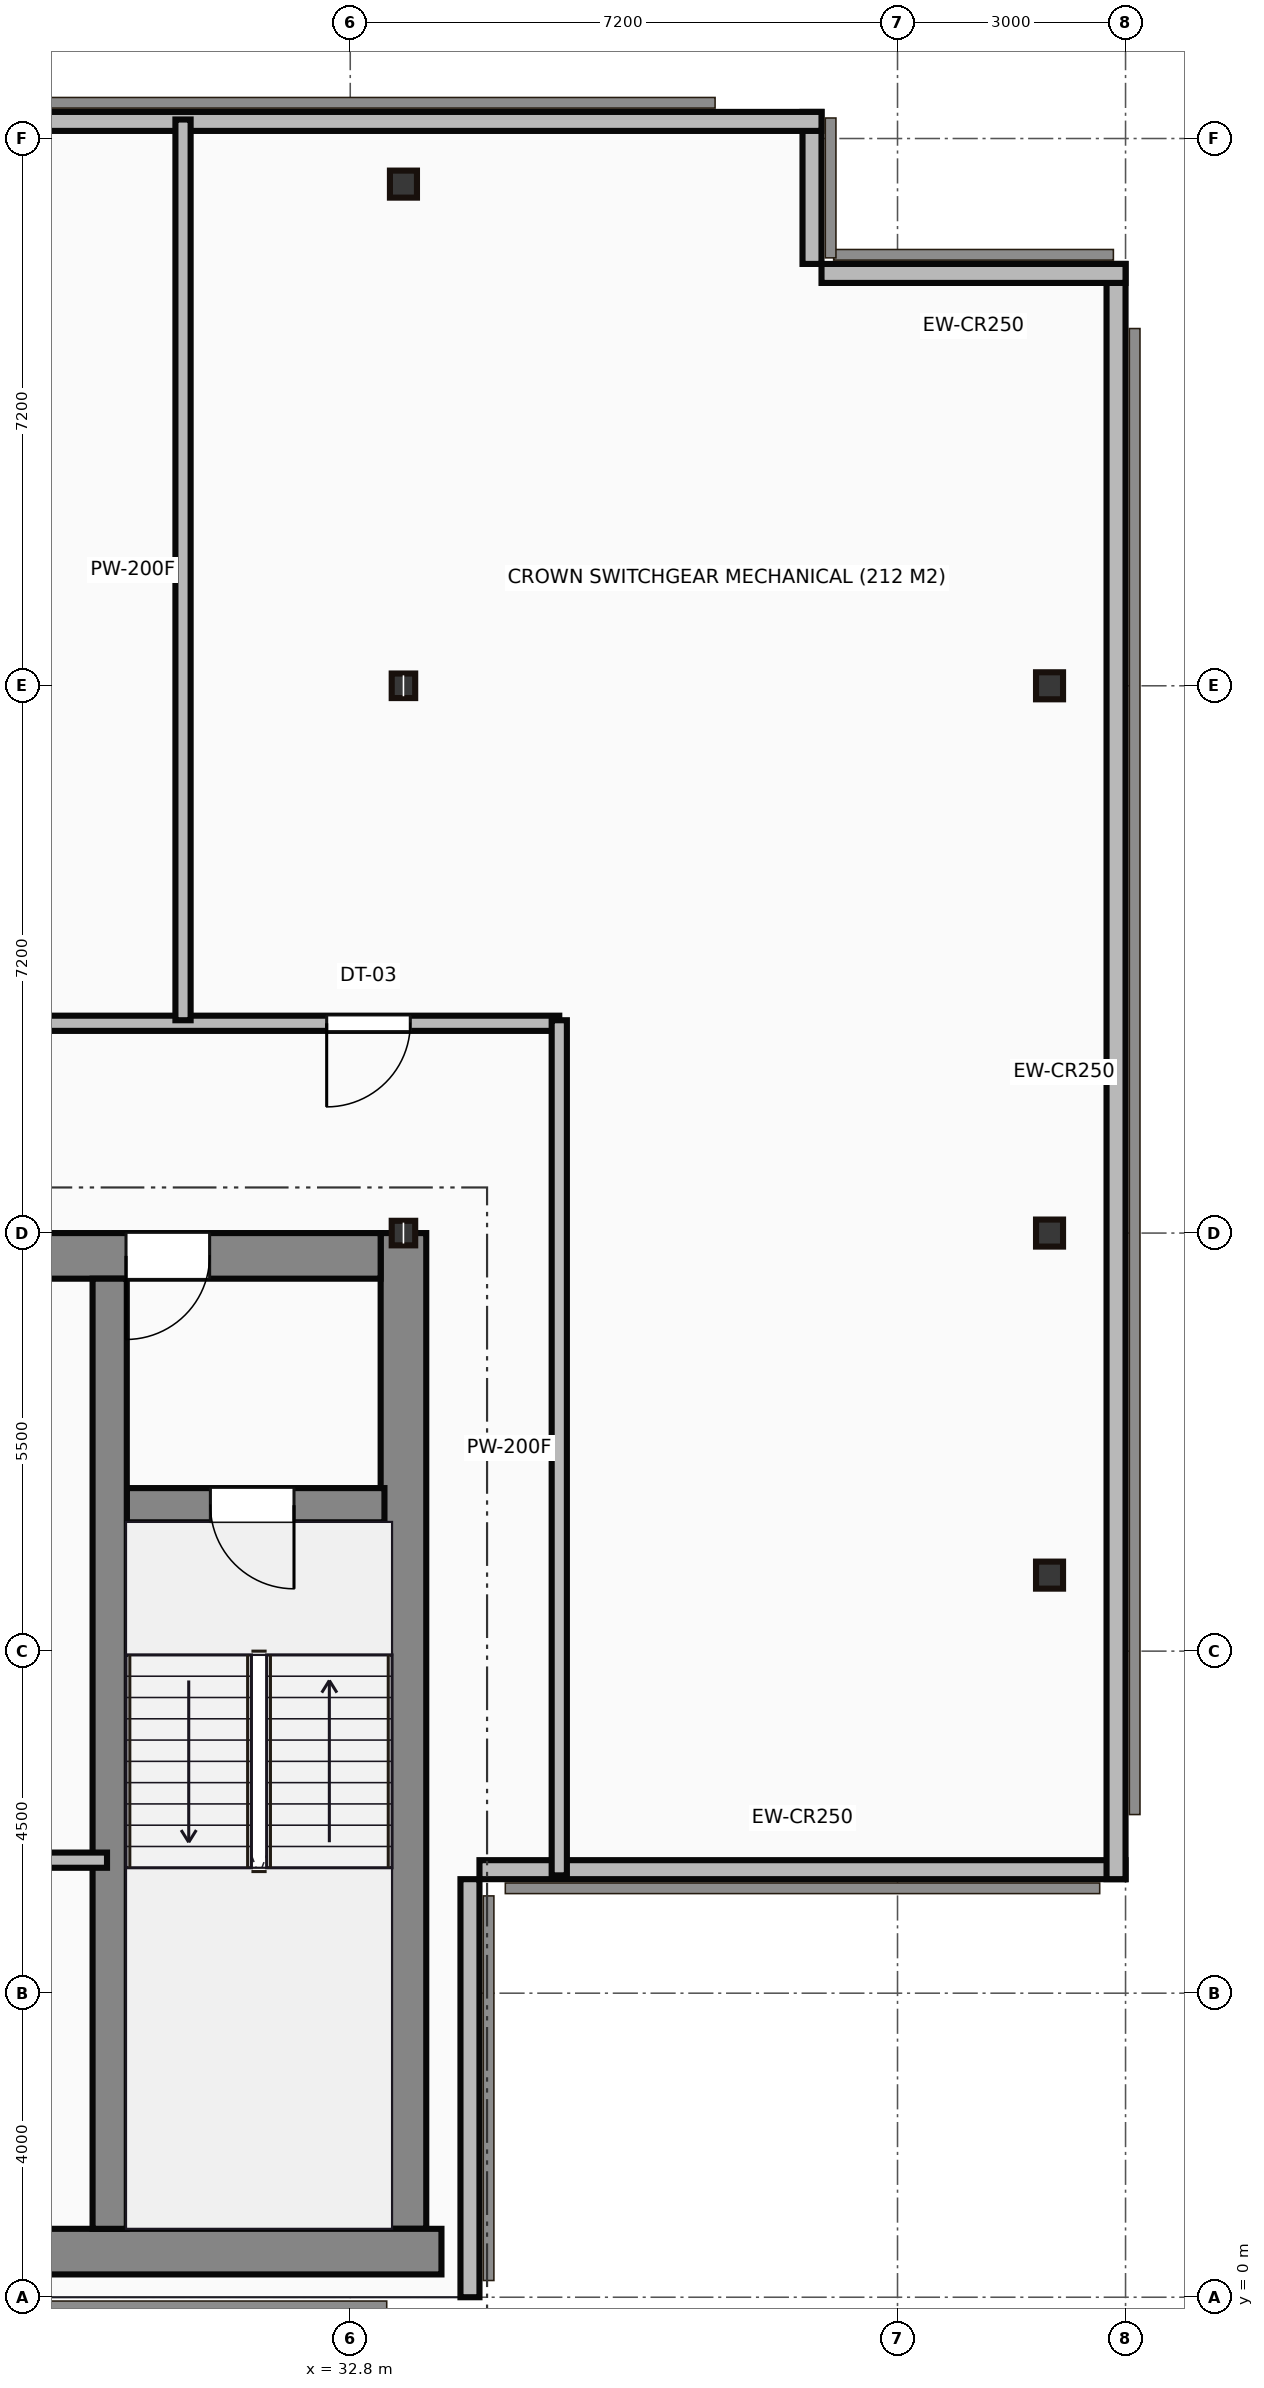
"""IFC4 building model, lengths in metres.
Left out: names, types, materials, properties, quantities, classifications, styles, units other than length and angle.
Written with IfcOpenShell. Run it as: python <this file> out.ifc"""

import sys

from ifc_helpers import new_model, si_unit, direction, frame, frame_2d, origin, origin_2d, place, context, subcontext, project, spatial, rectangle, hollow_rectangle, i_section, extrude, source, transform, mapped, element, fill, save


model = new_model("IFC4")
c1 = context("Model", 3, precision=1e-05, world=origin(), true_north=direction((0.0, 1.0)))
c2 = subcontext(c1, "Body", "Model", "MODEL_VIEW")
j1 = project(units=[si_unit("LENGTHUNIT", "METRE"), si_unit("PLANEANGLEUNIT", "RADIAN")], contexts=[c1])
p1 = place(None, origin())
s1 = spatial("IfcSite", under=j1, at=p1, CompositionType="ELEMENT")
p2 = place(p1, origin())
s2 = spatial("IfcBuilding", under=s1, at=p2, CompositionType="ELEMENT")
p3 = place(p2, frame((0.0, 0.0, 303.65)))
s3 = spatial("IfcBuildingStorey", under=s2, at=p3, CompositionType="ELEMENT", Elevation=303.65)
m1 = source(origin(), c2, "Body", "SweptSolid", [
    extrude(rectangle(XDim=29.5, YDim=0.6, at=frame_2d((14.75, 0.0))), origin(), (0.0, 0.0, 1.0), 3.8),
])
p4 = place(p3, frame((4.5, 0.6, 0.0), z_axis=(0.0, 0.0, 1.0), x_axis=(1.0, 0.0, 0.0)))
e1 = element("IfcWall", 1, at=p4, inside=s3, PredefinedType="SHEAR", context=c2, shape_type="MappedRepresentation", body=[
    mapped(m1, transform((0.0, 0.0, 0.0))),
])
m2 = source(origin(), c2, "Body", "SweptSolid", [
    extrude(rectangle(XDim=13.1, YDim=0.6, at=frame_2d((6.55, 0.0))), origin(), (0.0, 0.0, 1.0), 3.8),
])
p5 = place(p3, frame((33.5, 0.9, 0.0), z_axis=(0.0, 0.0, 1.0), x_axis=(0.0, 1.0, 0.0)))
e2 = element("IfcWall", 2, at=p5, inside=s3, PredefinedType="SHEAR", context=c2, shape_type="MappedRepresentation", body=[
    mapped(m2, transform((0.0, 0.0, 0.0))),
])
m3 = source(origin(), c2, "Body", "SweptSolid", [
    extrude(rectangle(XDim=12.6, YDim=0.6, at=frame_2d((6.3, 0.0))), origin(), (0.0, 0.0, 1.0), 3.8),
])
p6 = place(p3, frame((20.6, 13.7, 0.0), z_axis=(0.0, 0.0, 1.0), x_axis=(1.0, 0.0, 0.0)))
e3 = element("IfcWall", 3, at=p6, inside=s3, PredefinedType="SHEAR", context=c2, shape_type="MappedRepresentation", body=[
    mapped(m3, transform((0.0, 0.0, 0.0))),
])
p7 = place(p6, frame((9.25, 0.0, 0.0)))
e4 = element("IfcOpeningElement", 4, at=p7, cuts=e3, PredefinedType="OPENING", context=c2, shape_type="SweptSolid", body=[
    extrude(rectangle(XDim=1.1, YDim=2.15, at=frame_2d((0.55, 1.075))), frame((0.0, 0.31, 0.0), z_axis=(0.0, -1.0, 0.0), x_axis=(1.0, 0.0, 0.0)), (0.0, 0.0, 1.0), 0.62),
])
m4 = source(origin(), c2, "Body", "SweptSolid", [
    extrude(rectangle(XDim=12.5, YDim=0.45, at=frame_2d((6.25, 0.0))), origin(), (0.0, 0.0, 1.0), 3.8),
])
p8 = place(p3, frame((29.635, 0.9, 0.0), z_axis=(0.0, 0.0, 1.0), x_axis=(0.0, 1.0, 0.0)))
e5 = element("IfcWall", 5, at=p8, inside=s3, PredefinedType="SHEAR", context=c2, shape_type="MappedRepresentation", body=[
    mapped(m4, transform((0.0, 0.0, 0.0))),
])
m5 = source(origin(), c2, "Body", "SweptSolid", [
    extrude(rectangle(XDim=3.39, YDim=0.45, at=frame_2d((1.695, 0.0))), origin(), (0.0, 0.0, 1.0), 3.8),
])
p9 = place(p3, frame((29.86, 10.42, 0.0), z_axis=(0.0, 0.0, 1.0), x_axis=(1.0, 0.0, 0.0)))
e6 = element("IfcWall", 6, at=p9, inside=s3, PredefinedType="SHEAR", context=c2, shape_type="MappedRepresentation", body=[
    mapped(m5, transform((0.0, 0.0, 0.0))),
])
p10 = place(p9, frame((1.1, 0.0, 0.0)))
e7 = element("IfcOpeningElement", 7, at=p10, cuts=e6, PredefinedType="OPENING", context=c2, shape_type="SweptSolid", body=[
    extrude(rectangle(XDim=1.1, YDim=2.15, at=frame_2d((0.55, 1.075))), frame((0.0, 0.235, 0.0), z_axis=(0.0, -1.0, 0.0), x_axis=(1.0, 0.0, 0.0)), (0.0, 0.0, 1.0), 0.47),
])
m6 = source(origin(), c2, "Body", "SweptSolid", [
    extrude(i_section(OverallWidth=0.309, OverallDepth=0.323, WebThickness=0.014, FlangeThickness=0.023, at=origin_2d()), origin(), (0.0, 0.0, 1.0), 3.8),
])
for number, where, z_axis, x_axis in (
    (8, (33.5, 14.0, 0.0), (0.0, 0.0, 1.0), (1.0, 0.0, 0.0)),
    (9, (33.5, 21.2, 0.0), (0.0, 0.0, 1.0), (1.0, 0.0, 0.0)),
):
    element("IfcColumn", number, at=place(p3, frame(where, z_axis=z_axis, x_axis=x_axis)), inside=s3, PredefinedType="COLUMN", context=c2, shape_type="MappedRepresentation", body=[
        mapped(m6, transform((0.0, 0.0, 0.0))),
    ])
m7 = source(origin(), c2, "Body", "SweptSolid", [
    extrude(hollow_rectangle(XDim=0.356, YDim=0.356, WallThickness=0.019, at=origin_2d()), origin(), (0.0, 0.0, 1.0), 3.8),
])
for number, where, z_axis, x_axis in (
    (10, (33.5, 27.8, 0.0), (0.0, 0.0, 1.0), (1.0, 0.0, 0.0)),
    (11, (42.0, 9.5, 0.0), (0.0, 0.0, 1.0), (1.0, 0.0, 0.0)),
    (12, (42.0, 14.0, 0.0), (0.0, 0.0, 1.0), (1.0, 0.0, 0.0)),
    (13, (42.0, 21.2, 0.0), (0.0, 0.0, 1.0), (1.0, 0.0, 0.0)),
):
    element("IfcColumn", number, at=place(p3, frame(where, z_axis=z_axis, x_axis=x_axis)), inside=s3, PredefinedType="COLUMN", context=c2, shape_type="MappedRepresentation", body=[
        mapped(m7, transform((0.0, 0.0, 0.0))),
    ])
m8 = source(origin(), c2, "Body", "SweptSolid", [
    extrude(rectangle(XDim=5.5, YDim=0.25, at=frame_2d((2.75, 0.0))), origin(), (0.0, 0.0, 1.0), 3.5),
])
p11 = place(p3, frame((34.375, 0.0, 0.0), z_axis=(0.0, 0.0, 1.0), x_axis=(0.0, 1.0, 0.0)))
e14 = element("IfcWall", 14, at=p11, inside=s3, PredefinedType="STANDARD", context=c2, shape_type="MappedRepresentation", body=[
    mapped(m8, transform((0.0, 0.0, 0.0))),
])
m9 = source(origin(), c2, "Body", "SweptSolid", [
    extrude(rectangle(XDim=8.5, YDim=0.25, at=frame_2d((4.25, 0.0))), origin(), (0.0, 0.0, 1.0), 3.5),
])
p12 = place(p3, frame((34.5, 5.625, 0.0), z_axis=(0.0, 0.0, 1.0), x_axis=(1.0, 0.0, 0.0)))
e15 = element("IfcWall", 15, at=p12, inside=s3, PredefinedType="STANDARD", context=c2, shape_type="MappedRepresentation", body=[
    mapped(m9, transform((0.0, 0.0, 0.0))),
])
m10 = source(origin(), c2, "Body", "SweptSolid", [
    extrude(rectangle(XDim=21.25, YDim=0.25, at=frame_2d((10.625, 0.0))), origin(), (0.0, 0.0, 1.0), 3.5),
])
p13 = place(p3, frame((42.875, 5.5, 0.0), z_axis=(0.0, 0.0, 1.0), x_axis=(0.0, 1.0, 0.0)))
e16 = element("IfcWall", 16, at=p13, inside=s3, PredefinedType="STANDARD", context=c2, shape_type="MappedRepresentation", body=[
    mapped(m10, transform((0.0, 0.0, 0.0))),
])
m11 = source(origin(), c2, "Body", "SweptSolid", [
    extrude(rectangle(XDim=4.0, YDim=0.25, at=frame_2d((2.0, 0.0))), origin(), (0.0, 0.0, 1.0), 3.5),
])
p14 = place(p3, frame((43.0, 26.625, 0.0), z_axis=(0.0, 0.0, 1.0), x_axis=(-1.0, 0.0, 0.0)))
e17 = element("IfcWall", 17, at=p14, inside=s3, PredefinedType="STANDARD", context=c2, shape_type="MappedRepresentation", body=[
    mapped(m11, transform((0.0, 0.0, 0.0))),
])
m12 = source(origin(), c2, "Body", "SweptSolid", [
    extrude(rectangle(XDim=2.0, YDim=0.25, at=frame_2d((1.0, 0.0))), origin(), (0.0, 0.0, 1.0), 3.5),
])
p15 = place(p3, frame((38.875, 26.75, 0.0), z_axis=(0.0, 0.0, 1.0), x_axis=(0.0, 1.0, 0.0)))
e18 = element("IfcWall", 18, at=p15, inside=s3, PredefinedType="STANDARD", context=c2, shape_type="MappedRepresentation", body=[
    mapped(m12, transform((0.0, 0.0, 0.0))),
])
m13 = source(origin(), c2, "Body", "SweptSolid", [
    extrude(rectangle(XDim=35.0, YDim=0.25, at=frame_2d((17.5, 0.0))), origin(), (0.0, 0.0, 1.0), 3.5),
])
p16 = place(p3, frame((39.0, 28.625, 0.0), z_axis=(0.0, 0.0, 1.0), x_axis=(-1.0, 0.0, 0.0)))
e19 = element("IfcWall", 19, at=p16, inside=s3, PredefinedType="STANDARD", context=c2, shape_type="MappedRepresentation", body=[
    mapped(m13, transform((0.0, 0.0, 0.0))),
])
m14 = source(origin(), c2, "Body", "SweptSolid", [
    extrude(rectangle(XDim=4.6, YDim=0.2, at=frame_2d((2.3, 0.0))), origin(), (0.0, 0.0, 1.0), 3.5),
])
p17 = place(p3, frame((25.0, 5.75, 0.0), z_axis=(0.0, 0.0, 1.0), x_axis=(1.0, 0.0, 0.0)))
e20 = element("IfcWall", 20, at=p17, inside=s3, PredefinedType="PARTITIONING", context=c2, shape_type="MappedRepresentation", body=[
    mapped(m14, transform((0.0, 0.0, 0.0))),
])
m15 = source(origin(), c2, "Body", "SweptSolid", [
    extrude(rectangle(XDim=21.6, YDim=0.2, at=frame_2d((10.8, 0.0))), origin(), (0.0, 0.0, 1.0), 3.5),
])
p18 = place(p3, frame((13.95, 16.76, 0.0), z_axis=(0.0, 0.0, 1.0), x_axis=(1.0, 0.0, 0.0)))
e21 = element("IfcWall", 21, at=p18, inside=s3, PredefinedType="PARTITIONING", context=c2, shape_type="MappedRepresentation", body=[
    mapped(m15, transform((0.0, 0.0, 0.0))),
])
p19 = place(p18, frame((2.07, 0.0, 0.0)))
e22 = element("IfcOpeningElement", 22, at=p19, cuts=e21, PredefinedType="OPENING", context=c2, shape_type="SweptSolid", body=[
    extrude(rectangle(XDim=1.1, YDim=2.15, at=frame_2d((0.55, 1.075))), frame((0.0, 0.11, 0.0), z_axis=(0.0, -1.0, 0.0), x_axis=(1.0, 0.0, 0.0)), (0.0, 0.0, 1.0), 0.22),
])
p20 = place(p18, frame((10.4, 0.0, 0.0)))
e23 = element("IfcOpeningElement", 23, at=p20, cuts=e21, PredefinedType="OPENING", context=c2, shape_type="SweptSolid", body=[
    extrude(rectangle(XDim=1.1, YDim=2.15, at=frame_2d((0.55, 1.075))), frame((0.0, 0.11, 0.0), z_axis=(0.0, -1.0, 0.0), x_axis=(1.0, 0.0, 0.0)), (0.0, 0.0, 1.0), 0.22),
])
p21 = place(p18, frame((18.54, 0.0, 0.0)))
e24 = element("IfcOpeningElement", 24, at=p21, cuts=e21, PredefinedType="OPENING", context=c2, shape_type="SweptSolid", body=[
    extrude(rectangle(XDim=1.1, YDim=2.15, at=frame_2d((0.55, 1.075))), frame((0.0, 0.11, 0.0), z_axis=(0.0, -1.0, 0.0), x_axis=(1.0, 0.0, 0.0)), (0.0, 0.0, 1.0), 0.22),
])
m16 = source(origin(), c2, "Body", "SweptSolid", [
    extrude(rectangle(XDim=11.25, YDim=0.2, at=frame_2d((5.625, 0.0))), origin(), (0.0, 0.0, 1.0), 3.5),
])
p22 = place(p3, frame((35.55, 5.55, 0.0), z_axis=(0.0, 0.0, 1.0), x_axis=(0.0, 1.0, 0.0)))
e25 = element("IfcWall", 25, at=p22, inside=s3, PredefinedType="PARTITIONING", context=c2, shape_type="MappedRepresentation", body=[
    mapped(m16, transform((0.0, 0.0, 0.0))),
])
m17 = source(origin(), c2, "Body", "SweptSolid", [
    extrude(rectangle(XDim=11.85, YDim=0.2, at=frame_2d((5.925, 0.0))), origin(), (0.0, 0.0, 1.0), 3.5),
])
p23 = place(p3, frame((30.6, 16.8, 0.0), z_axis=(0.0, 0.0, 1.0), x_axis=(0.0, 1.0, 0.0)))
e26 = element("IfcWall", 26, at=p23, inside=s3, PredefinedType="PARTITIONING", context=c2, shape_type="MappedRepresentation", body=[
    mapped(m17, transform((0.0, 0.0, 0.0))),
])
m18 = source(origin(), c2, "Body", "SweptSolid", [
    extrude(rectangle(XDim=1.1, YDim=2.15, at=frame_2d((0.55, 1.075))), frame((0.0, 0.025, 0.0), z_axis=(0.0, -1.0, 0.0), x_axis=(1.0, 0.0, 0.0)), (0.0, 0.0, 1.0), 0.05),
])
p24 = place(p10, frame((1.1, 0.0, 0.0), z_axis=(0.0, 0.0, 1.0), x_axis=(-1.0, 0.0, 0.0)))
e27 = element("IfcDoor", 27, at=p24, inside=s3, OperationType="SINGLE_SWING_RIGHT", PredefinedType="DOOR", context=c2, shape_type="MappedRepresentation", body=[
    mapped(m18, transform((0.0, 0.0, 0.0))),
])
fill(e7, e27)
p25 = place(p7, origin())
e28 = element("IfcDoor", 28, at=p25, inside=s3, OperationType="SINGLE_SWING_LEFT", PredefinedType="DOOR", context=c2, shape_type="MappedRepresentation", body=[
    mapped(m18, transform((0.0, 0.0, 0.0))),
])
fill(e4, e28)
p26 = place(p21, origin())
e29 = element("IfcDoor", 29, at=p26, inside=s3, OperationType="SINGLE_SWING_LEFT", PredefinedType="DOOR", context=c2, shape_type="MappedRepresentation", body=[
    mapped(m18, transform((0.0, 0.0, 0.0))),
])
fill(e24, e29)
save(model, sys.argv[1])
